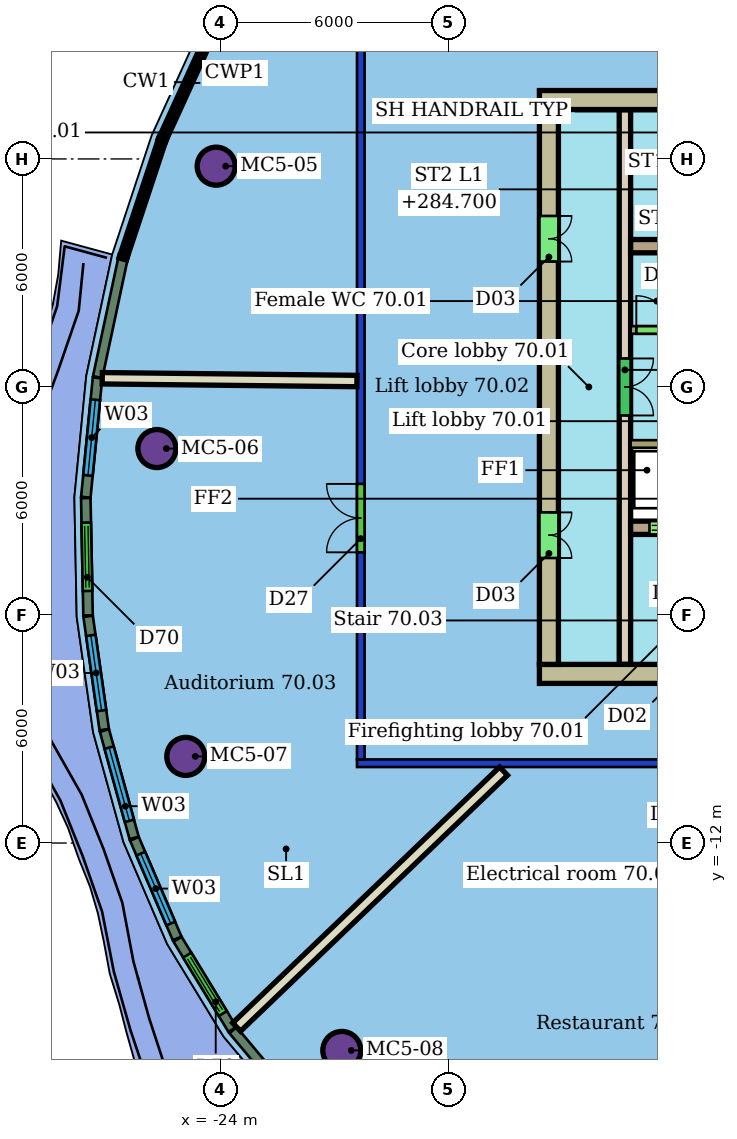
"""IFC4 building model, lengths in metres.
Left out: names, types, materials, properties, quantities, classifications, styles, units other than length and angle.
Written with IfcOpenShell. Run it as: python <this file> out.ifc"""

import sys

from ifc_helpers import new_model, si_unit, direction, frame, frame_2d, origin, origin_2d, place, context, subcontext, project, spatial, rectangle, hollow_circle, extrude, element, fill, save


model = new_model("IFC4")
c1 = context("Model", 3, precision=1e-05, world=origin(), true_north=direction((0.0, 1.0)))
c2 = subcontext(c1, "Body", "Model", "MODEL_VIEW")
j1 = project(units=[si_unit("LENGTHUNIT", "METRE"), si_unit("PLANEANGLEUNIT", "RADIAN")], contexts=[c1])
p1 = place(None, origin())
s1 = spatial("IfcSite", under=j1, at=p1, CompositionType="ELEMENT")
p2 = place(p1, origin())
s2 = spatial("IfcBuilding", under=s1, at=p2, CompositionType="ELEMENT")
p3 = place(p2, frame((0.0, 0.0, 282.9)))
s3 = spatial("IfcBuildingStorey", under=s2, at=p3, CompositionType="ELEMENT", Elevation=282.9)
for number, where, z_axis, x_axis in (
    (1, (-24.106, 5.81, 0.0), (0.0, 0.0, 1.0), (1.0, 0.0, 0.0)),
    (2, (-25.666, -1.62, 0.0), (0.0, 0.0, 1.0), (1.0, 0.0, 0.0)),
    (3, (-24.906, -9.72, 0.0), (0.0, 0.0, 1.0), (1.0, 0.0, 0.0)),
    (4, (-20.8, -17.457, 0.0), (0.0, 0.0, 1.0), (1.0, 0.0, 0.0)),
):
    element("IfcColumn", number, at=place(p3, frame(where, z_axis=z_axis, x_axis=x_axis)), inside=s3, PredefinedType="COLUMN", context=c2, shape_type="SweptSolid", body=[
        extrude(hollow_circle(Radius=0.5, WallThickness=0.04, at=origin_2d()), origin(), (0.0, 0.0, 1.0), 3.45),
    ])
p4 = place(p3, frame((8.4, -9.9, 0.0), z_axis=(0.0, 0.0, 1.0), x_axis=(-1.0, 0.0, 0.0)))
e5 = element("IfcWall", 5, at=p4, inside=s3, PredefinedType="PARTITIONING", context=c2, shape_type="SweptSolid", body=[
    extrude(rectangle(XDim=28.8, YDim=0.2, at=frame_2d((14.4, 0.0))), origin(), (0.0, 0.0, 1.0), 3.1),
])
p5 = place(p4, frame((17.579, 0.0, 0.0)))
e6 = element("IfcOpeningElement", 6, at=p5, cuts=e5, PredefinedType="OPENING", context=c2, shape_type="SweptSolid", body=[
    extrude(rectangle(XDim=1.5, YDim=2.4, at=frame_2d((0.75, 1.2))), frame((0.0, 0.11, 0.0), z_axis=(0.0, -1.0, 0.0), x_axis=(1.0, 0.0, 0.0)), (0.0, 0.0, 1.0), 0.22),
])
p6 = place(p4, frame((9.185, 0.0, 0.0)))
e7 = element("IfcOpeningElement", 7, at=p6, cuts=e5, PredefinedType="OPENING", context=c2, shape_type="SweptSolid", body=[
    extrude(rectangle(XDim=1.8, YDim=2.4, at=frame_2d((0.9, 1.2))), frame((0.0, 0.11, 0.0), z_axis=(0.0, -1.0, 0.0), x_axis=(1.0, 0.0, 0.0)), (0.0, 0.0, 1.0), 0.22),
])
p7 = place(p3, frame((-20.3, -9.8, 0.0), z_axis=(0.0, 0.0, 1.0), x_axis=(0.0, 1.0, 0.0)))
e8 = element("IfcWall", 8, at=p7, inside=s3, PredefinedType="PARTITIONING", context=c2, shape_type="SweptSolid", body=[
    extrude(rectangle(XDim=19.6, YDim=0.2, at=frame_2d((9.8, 0.0))), origin(), (0.0, 0.0, 1.0), 3.1),
])
p8 = place(p7, frame((5.449, 0.0, 0.0)))
e9 = element("IfcOpeningElement", 9, at=p8, cuts=e8, PredefinedType="OPENING", context=c2, shape_type="SweptSolid", body=[
    extrude(rectangle(XDim=1.8, YDim=2.4, at=frame_2d((0.9, 1.2))), frame((0.0, 0.11, 0.0), z_axis=(0.0, -1.0, 0.0), x_axis=(1.0, 0.0, 0.0)), (0.0, 0.0, 1.0), 0.22),
])
p9 = place(p3, frame((-27.104, 0.229, 0.0), z_axis=(0.0, 0.0, 1.0), x_axis=(0.999941086317, -0.010854671562, 0.0)))
e10 = element("IfcWall", 10, at=p9, inside=s3, PredefinedType="PARTITIONING", context=c2, shape_type="SweptSolid", body=[
    extrude(rectangle(XDim=6.703, YDim=0.3, at=frame_2d((3.351, 0.0))), origin(), (0.0, 0.0, 1.0), 3.45),
])
p10 = place(p3, frame((-23.568, -16.842, 0.0), z_axis=(0.0, 0.0, 1.0), x_axis=(0.721865986277, 0.692032873393, 0.0)))
e11 = element("IfcWall", 11, at=p10, inside=s3, PredefinedType="PARTITIONING", context=c2, shape_type="SweptSolid", body=[
    extrude(rectangle(XDim=9.73, YDim=0.3, at=frame_2d((4.865, 0.0))), origin(), (0.0, 0.0, 1.0), 3.45),
])
p11 = place(p3, frame((-26.564, 3.353, 0.0), z_axis=(0.0, 0.0, 1.0), x_axis=(-0.208864865709, -0.977944511653, 0.0)))
e12 = element("IfcWall", 12, at=p11, inside=s3, PredefinedType="SOLIDWALL", context=c2, shape_type="SweptSolid", body=[
    extrude(rectangle(XDim=3.163, YDim=0.25, at=frame_2d((1.582, 0.0))), origin(), (0.0, 0.0, 1.0), 3.15),
])
p12 = place(p3, frame((-27.228, 0.238, 0.0), z_axis=(0.0, 0.0, 1.0), x_axis=(-0.097526326892, -0.995232945377, 0.0)))
e13 = element("IfcWall", 13, at=p12, inside=s3, PredefinedType="SOLIDWALL", context=c2, shape_type="SweptSolid", body=[
    extrude(rectangle(XDim=3.154, YDim=0.25, at=frame_2d((1.577, 0.0))), origin(), (0.0, 0.0, 1.0), 3.15),
])
p13 = place(p12, frame((0.577, 0.0, 0.9)))
e14 = element("IfcOpeningElement", 14, at=p13, cuts=e13, PredefinedType="OPENING", context=c2, shape_type="SweptSolid", body=[
    extrude(rectangle(XDim=2.0, YDim=2.1, at=frame_2d((1.0, 1.05))), frame((0.0, 0.135, 0.0), z_axis=(0.0, -1.0, 0.0), x_axis=(1.0, 0.0, 0.0)), (0.0, 0.0, 1.0), 0.27),
])
p14 = place(p3, frame((-27.537, -2.924, 0.0), z_axis=(0.0, 0.0, 1.0), x_axis=(0.019213534435, -0.999815403009, 0.0)))
e15 = element("IfcWall", 15, at=p14, inside=s3, PredefinedType="SOLIDWALL", context=c2, shape_type="SweptSolid", body=[
    extrude(rectangle(XDim=3.088, YDim=0.25, at=frame_2d((1.544, 0.0))), origin(), (0.0, 0.0, 1.0), 3.15),
])
p15 = place(p14, frame((0.644, 0.0, 0.0)))
e16 = element("IfcOpeningElement", 16, at=p15, cuts=e15, PredefinedType="OPENING", context=c2, shape_type="SweptSolid", body=[
    extrude(rectangle(XDim=1.8, YDim=2.4, at=frame_2d((0.9, 1.2))), frame((0.0, 0.135, 0.0), z_axis=(0.0, -1.0, 0.0), x_axis=(1.0, 0.0, 0.0)), (0.0, 0.0, 1.0), 0.27),
])
p16 = place(p3, frame((-27.476, -6.034, 0.0), z_axis=(0.0, 0.0, 1.0), x_axis=(0.140956080181, -0.990015850105, 0.0)))
e17 = element("IfcWall", 17, at=p16, inside=s3, PredefinedType="SOLIDWALL", context=c2, shape_type="SweptSolid", body=[
    extrude(rectangle(XDim=3.012, YDim=0.25, at=frame_2d((1.506, 0.0))), origin(), (0.0, 0.0, 1.0), 3.15),
])
p17 = place(p16, frame((0.506, 0.0, 0.9)))
e18 = element("IfcOpeningElement", 18, at=p17, cuts=e17, PredefinedType="OPENING", context=c2, shape_type="SweptSolid", body=[
    extrude(rectangle(XDim=2.0, YDim=2.1, at=frame_2d((1.0, 1.05))), frame((0.0, 0.135, 0.0), z_axis=(0.0, -1.0, 0.0), x_axis=(1.0, 0.0, 0.0)), (0.0, 0.0, 1.0), 0.27),
])
p18 = place(p3, frame((-27.046, -9.04, 0.0), z_axis=(0.0, 0.0, 1.0), x_axis=(0.266526791612, -0.963827510166, 0.0)))
e19 = element("IfcWall", 19, at=p18, inside=s3, PredefinedType="SOLIDWALL", context=c2, shape_type="SweptSolid", body=[
    extrude(rectangle(XDim=2.931, YDim=0.25, at=frame_2d((1.466, 0.0))), origin(), (0.0, 0.0, 1.0), 3.15),
])
p19 = place(p18, frame((0.466, 0.0, 0.9)))
e20 = element("IfcOpeningElement", 20, at=p19, cuts=e19, PredefinedType="OPENING", context=c2, shape_type="SweptSolid", body=[
    extrude(rectangle(XDim=2.0, YDim=2.1, at=frame_2d((1.0, 1.05))), frame((0.0, 0.135, 0.0), z_axis=(0.0, -1.0, 0.0), x_axis=(1.0, 0.0, 0.0)), (0.0, 0.0, 1.0), 0.27),
])
p20 = place(p3, frame((-26.257, -11.888, 0.0), z_axis=(0.0, 0.0, 1.0), x_axis=(0.394043302687, -0.919091875499, 0.0)))
e21 = element("IfcWall", 21, at=p20, inside=s3, PredefinedType="SOLIDWALL", context=c2, shape_type="SweptSolid", body=[
    extrude(rectangle(XDim=2.851, YDim=0.25, at=frame_2d((1.426, 0.0))), origin(), (0.0, 0.0, 1.0), 3.15),
])
p21 = place(p20, frame((0.426, 0.0, 0.9)))
e22 = element("IfcOpeningElement", 22, at=p21, cuts=e21, PredefinedType="OPENING", context=c2, shape_type="SweptSolid", body=[
    extrude(rectangle(XDim=2.0, YDim=2.1, at=frame_2d((1.0, 1.05))), frame((0.0, 0.135, 0.0), z_axis=(0.0, -1.0, 0.0), x_axis=(1.0, 0.0, 0.0)), (0.0, 0.0, 1.0), 0.27),
])
p22 = place(p3, frame((-25.122, -14.532, 0.0), z_axis=(0.0, 0.0, 1.0), x_axis=(0.520443293114, -0.853896234125, 0.0)))
e23 = element("IfcWall", 23, at=p22, inside=s3, PredefinedType="SOLIDWALL", context=c2, shape_type="SweptSolid", body=[
    extrude(rectangle(XDim=2.777, YDim=0.25, at=frame_2d((1.389, 0.0))), origin(), (0.0, 0.0, 1.0), 3.15),
])
p23 = place(p22, frame((0.489, 0.0, 0.0)))
e24 = element("IfcOpeningElement", 24, at=p23, cuts=e23, PredefinedType="OPENING", context=c2, shape_type="SweptSolid", body=[
    extrude(rectangle(XDim=1.8, YDim=2.4, at=frame_2d((0.9, 1.2))), frame((0.0, 0.135, 0.0), z_axis=(0.0, -1.0, 0.0), x_axis=(1.0, 0.0, 0.0)), (0.0, 0.0, 1.0), 0.27),
])
p24 = place(p3, frame((-23.661, -16.925, 0.0), z_axis=(0.0, 0.0, 1.0), x_axis=(0.641449708793, -0.767165087246, 0.0)))
e25 = element("IfcWall", 25, at=p24, inside=s3, PredefinedType="SOLIDWALL", context=c2, shape_type="SweptSolid", body=[
    extrude(rectangle(XDim=2.674, YDim=0.25, at=frame_2d((1.337, 0.0))), origin(), (0.0, 0.0, 1.0), 3.15),
])
p25 = place(p3, frame((-6.0, 7.55, 0.0), z_axis=(0.0, 0.0, 1.0), x_axis=(-1.0, 0.0, 0.0)))
e26 = element("IfcWall", 26, at=p25, inside=s3, PredefinedType="SHEAR", context=c2, shape_type="SweptSolid", body=[
    extrude(rectangle(XDim=9.6, YDim=0.5, at=frame_2d((4.8, 0.0))), origin(), (0.0, 0.0, 1.0), 3.3),
])
p26 = place(p25, frame((5.2, 0.0, 0.0)))
e27 = element("IfcOpeningElement", 27, at=p26, cuts=e26, PredefinedType="OPENING", context=c2, shape_type="SweptSolid", body=[
    extrude(rectangle(XDim=1.2, YDim=2.1, at=frame_2d((0.6, 1.05))), frame((0.0, 0.26, 0.0), z_axis=(0.0, -1.0, 0.0), x_axis=(1.0, 0.0, 0.0)), (0.0, 0.0, 1.0), 0.52),
])
p27 = place(p3, frame((-15.6, -7.55, 0.0), z_axis=(0.0, 0.0, 1.0), x_axis=(1.0, 0.0, 0.0)))
e28 = element("IfcWall", 28, at=p27, inside=s3, PredefinedType="SHEAR", context=c2, shape_type="SweptSolid", body=[
    extrude(rectangle(XDim=19.2, YDim=0.5, at=frame_2d((9.6, 0.0))), origin(), (0.0, 0.0, 1.0), 3.3),
])
p28 = place(p27, frame((3.6, 0.0, 0.0)))
e29 = element("IfcOpeningElement", 29, at=p28, cuts=e28, PredefinedType="OPENING", context=c2, shape_type="SweptSolid", body=[
    extrude(rectangle(XDim=1.2, YDim=2.1, at=frame_2d((0.6, 1.05))), frame((0.0, 0.26, 0.0), z_axis=(0.0, -1.0, 0.0), x_axis=(1.0, 0.0, 0.0)), (0.0, 0.0, 1.0), 0.52),
])
p29 = place(p3, frame((-15.35, 7.3, 0.0), z_axis=(0.0, 0.0, 1.0), x_axis=(0.0, -1.0, 0.0)))
e30 = element("IfcWall", 30, at=p29, inside=s3, PredefinedType="SHEAR", context=c2, shape_type="SweptSolid", body=[
    extrude(rectangle(XDim=14.6, YDim=0.5, at=frame_2d((7.3, 0.0))), origin(), (0.0, 0.0, 1.0), 3.3),
])
p30 = place(p29, frame((10.6, 0.0, 0.0)))
e31 = element("IfcOpeningElement", 31, at=p30, cuts=e30, PredefinedType="OPENING", context=c2, shape_type="SweptSolid", body=[
    extrude(rectangle(XDim=1.2, YDim=2.1, at=frame_2d((0.6, 1.05))), frame((0.0, 0.26, 0.0), z_axis=(0.0, -1.0, 0.0), x_axis=(1.0, 0.0, 0.0)), (0.0, 0.0, 1.0), 0.52),
])
p31 = place(p29, frame((2.8, 0.0, 0.0)))
e32 = element("IfcOpeningElement", 32, at=p31, cuts=e30, PredefinedType="OPENING", context=c2, shape_type="SweptSolid", body=[
    extrude(rectangle(XDim=1.2, YDim=2.1, at=frame_2d((0.6, 1.05))), frame((0.0, 0.26, 0.0), z_axis=(0.0, -1.0, 0.0), x_axis=(1.0, 0.0, 0.0)), (0.0, 0.0, 1.0), 0.52),
])
p32 = place(p3, frame((-13.2, 3.705, 0.0), z_axis=(0.0, 0.0, 1.0), x_axis=(1.0, 0.0, 0.0)))
e33 = element("IfcWall", 33, at=p32, inside=s3, PredefinedType="SHEAR", context=c2, shape_type="SweptSolid", body=[
    extrude(rectangle(XDim=7.2, YDim=0.35, at=frame_2d((3.6, 0.0))), origin(), (0.0, 0.0, 1.0), 3.3),
])
p33 = place(p3, frame((-13.2, -3.705, 0.0), z_axis=(0.0, 0.0, 1.0), x_axis=(1.0, 0.0, 0.0)))
e34 = element("IfcWall", 34, at=p33, inside=s3, PredefinedType="SHEAR", context=c2, shape_type="SweptSolid", body=[
    extrude(rectangle(XDim=7.2, YDim=0.35, at=frame_2d((3.6, 0.0))), origin(), (0.0, 0.0, 1.0), 3.3),
])
p34 = place(p33, frame((0.496, 0.0, 0.0)))
e35 = element("IfcOpeningElement", 35, at=p34, cuts=e34, PredefinedType="OPENING", context=c2, shape_type="SweptSolid", body=[
    extrude(rectangle(XDim=1.2, YDim=2.1, at=frame_2d((0.6, 1.05))), frame((0.0, 0.185, 0.0), z_axis=(0.0, -1.0, 0.0), x_axis=(1.0, 0.0, 0.0)), (0.0, 0.0, 1.0), 0.37),
])
p35 = place(p33, frame((2.938, 0.0, 0.0)))
e36 = element("IfcOpeningElement", 36, at=p35, cuts=e34, PredefinedType="OPENING", context=c2, shape_type="SweptSolid", body=[
    extrude(rectangle(XDim=1.2, YDim=2.1, at=frame_2d((0.6, 1.05))), frame((0.0, 0.185, 0.0), z_axis=(0.0, -1.0, 0.0), x_axis=(1.0, 0.0, 0.0)), (0.0, 0.0, 1.0), 0.37),
])
p36 = place(p3, frame((-13.35, 7.3, 0.0), z_axis=(0.0, 0.0, 1.0), x_axis=(0.0, -1.0, 0.0)))
e37 = element("IfcWall", 37, at=p36, inside=s3, PredefinedType="SHEAR", context=c2, shape_type="SweptSolid", body=[
    extrude(rectangle(XDim=14.6, YDim=0.3, at=frame_2d((7.3, 0.0))), origin(), (0.0, 0.0, 1.0), 3.3),
])
p37 = place(p36, frame((6.55, 0.0, 0.0)))
e38 = element("IfcOpeningElement", 38, at=p37, cuts=e37, PredefinedType="OPENING", context=c2, shape_type="SweptSolid", body=[
    extrude(rectangle(XDim=1.5, YDim=2.1, at=frame_2d((0.75, 1.05))), frame((0.0, 0.16, 0.0), z_axis=(0.0, -1.0, 0.0), x_axis=(1.0, 0.0, 0.0)), (0.0, 0.0, 1.0), 0.32),
])
p38 = place(p3, frame((-13.2, 1.5, 0.0), z_axis=(0.0, 0.0, 1.0), x_axis=(1.0, 0.0, 0.0)))
e39 = element("IfcWall", 39, at=p38, inside=s3, PredefinedType="SHEAR", context=c2, shape_type="SweptSolid", body=[
    extrude(rectangle(XDim=14.4, YDim=0.2, at=frame_2d((7.2, 0.0))), origin(), (0.0, 0.0, 1.0), 3.3),
])
p39 = place(p38, frame((10.312, 0.0, 0.0)))
e40 = element("IfcOpeningElement", 40, at=p39, cuts=e39, PredefinedType="OPENING", context=c2, shape_type="SweptSolid", body=[
    extrude(rectangle(XDim=1.1, YDim=2.1, at=frame_2d((0.55, 1.05))), frame((0.0, 0.11, 0.0), z_axis=(0.0, -1.0, 0.0), x_axis=(1.0, 0.0, 0.0)), (0.0, 0.0, 1.0), 0.22),
])
p40 = place(p38, frame((12.754, 0.0, 0.0)))
e41 = element("IfcOpeningElement", 41, at=p40, cuts=e39, PredefinedType="OPENING", context=c2, shape_type="SweptSolid", body=[
    extrude(rectangle(XDim=1.1, YDim=2.1, at=frame_2d((0.55, 1.05))), frame((0.0, 0.11, 0.0), z_axis=(0.0, -1.0, 0.0), x_axis=(1.0, 0.0, 0.0)), (0.0, 0.0, 1.0), 0.22),
])
p41 = place(p38, frame((0.15, 0.0, 0.0)))
e42 = element("IfcOpeningElement", 42, at=p41, cuts=e39, PredefinedType="OPENING", context=c2, shape_type="SweptSolid", body=[
    extrude(rectangle(XDim=0.9, YDim=2.1, at=frame_2d((0.45, 1.05))), frame((0.0, 0.11, 0.0), z_axis=(0.0, -1.0, 0.0), x_axis=(1.0, 0.0, 0.0)), (0.0, 0.0, 1.0), 0.22),
])
p42 = place(p38, frame((4.222, 0.0, 0.0)))
e43 = element("IfcOpeningElement", 43, at=p42, cuts=e39, PredefinedType="OPENING", context=c2, shape_type="SweptSolid", body=[
    extrude(rectangle(XDim=0.9, YDim=2.1, at=frame_2d((0.45, 1.05))), frame((0.0, 0.11, 0.0), z_axis=(0.0, -1.0, 0.0), x_axis=(1.0, 0.0, 0.0)), (0.0, 0.0, 1.0), 0.22),
])
p43 = place(p38, frame((8.367, 0.0, 0.0)))
e44 = element("IfcOpeningElement", 44, at=p43, cuts=e39, PredefinedType="OPENING", context=c2, shape_type="SweptSolid", body=[
    extrude(rectangle(XDim=1.0, YDim=2.1, at=frame_2d((0.5, 1.05))), frame((0.0, 0.11, 0.0), z_axis=(0.0, -1.0, 0.0), x_axis=(1.0, 0.0, 0.0)), (0.0, 0.0, 1.0), 0.22),
])
p44 = place(p3, frame((1.2, -1.5, 0.0), z_axis=(0.0, 0.0, 1.0), x_axis=(-1.0, 0.0, 0.0)))
e45 = element("IfcWall", 45, at=p44, inside=s3, PredefinedType="SHEAR", context=c2, shape_type="SweptSolid", body=[
    extrude(rectangle(XDim=14.4, YDim=0.2, at=frame_2d((7.2, 0.0))), origin(), (0.0, 0.0, 1.0), 3.3),
])
p45 = place(p44, frame((7.821, 0.0, 0.0)))
e46 = element("IfcOpeningElement", 46, at=p45, cuts=e45, PredefinedType="OPENING", context=c2, shape_type="SweptSolid", body=[
    extrude(rectangle(XDim=1.2, YDim=2.1, at=frame_2d((0.6, 1.05))), frame((0.0, 0.11, 0.0), z_axis=(0.0, -1.0, 0.0), x_axis=(1.0, 0.0, 0.0)), (0.0, 0.0, 1.0), 0.22),
])
p46 = place(p44, frame((0.546, 0.0, 0.0)))
e47 = element("IfcOpeningElement", 47, at=p46, cuts=e45, PredefinedType="OPENING", context=c2, shape_type="SweptSolid", body=[
    extrude(rectangle(XDim=1.1, YDim=2.1, at=frame_2d((0.55, 1.05))), frame((0.0, 0.11, 0.0), z_axis=(0.0, -1.0, 0.0), x_axis=(1.0, 0.0, 0.0)), (0.0, 0.0, 1.0), 0.22),
])
p47 = place(p44, frame((4.335, 0.0, 0.0)))
e48 = element("IfcOpeningElement", 48, at=p47, cuts=e45, PredefinedType="OPENING", context=c2, shape_type="SweptSolid", body=[
    extrude(rectangle(XDim=1.0, YDim=2.1, at=frame_2d((0.5, 1.05))), frame((0.0, 0.11, 0.0), z_axis=(0.0, -1.0, 0.0), x_axis=(1.0, 0.0, 0.0)), (0.0, 0.0, 1.0), 0.22),
])
p48 = place(p44, frame((2.592, 0.0, 0.0)))
e49 = element("IfcOpeningElement", 49, at=p48, cuts=e45, PredefinedType="OPENING", context=c2, shape_type="SweptSolid", body=[
    extrude(rectangle(XDim=1.0, YDim=2.1, at=frame_2d((0.5, 1.05))), frame((0.0, 0.11, 0.0), z_axis=(0.0, -1.0, 0.0), x_axis=(1.0, 0.0, 0.0)), (0.0, 0.0, 1.0), 0.22),
])
p49 = place(p8, origin())
e50 = element("IfcDoor", 50, at=p49, inside=s3, OperationType="DOUBLE_DOOR_SINGLE_SWING", PredefinedType="DOOR", context=c2, shape_type="SweptSolid", body=[
    extrude(rectangle(XDim=1.8, YDim=2.4, at=frame_2d((0.9, 1.2))), frame((0.0, 0.025, 0.0), z_axis=(0.0, -1.0, 0.0), x_axis=(1.0, 0.0, 0.0)), (0.0, 0.0, 1.0), 0.05),
])
fill(e9, e50)
p50 = place(p13, origin())
e51 = element("IfcWindow", 51, at=p50, inside=s3, PartitioningType="SINGLE_PANEL", PredefinedType="WINDOW", context=c2, shape_type="SweptSolid", body=[
    extrude(rectangle(XDim=2.0, YDim=2.1, at=frame_2d((1.0, 1.05))), frame((0.0, 0.03, 0.0), z_axis=(0.0, -1.0, 0.0), x_axis=(1.0, 0.0, 0.0)), (0.0, 0.0, 1.0), 0.06),
])
fill(e14, e51)
p51 = place(p15, origin())
e52 = element("IfcDoor", 52, at=p51, inside=s3, OperationType="DOUBLE_DOOR_SLIDING", PredefinedType="DOOR", context=c2, shape_type="SweptSolid", body=[
    extrude(rectangle(XDim=1.8, YDim=2.4, at=frame_2d((0.9, 1.2))), frame((0.0, 0.025, 0.0), z_axis=(0.0, -1.0, 0.0), x_axis=(1.0, 0.0, 0.0)), (0.0, 0.0, 1.0), 0.05),
])
fill(e16, e52)
p52 = place(p17, origin())
e53 = element("IfcWindow", 53, at=p52, inside=s3, PartitioningType="SINGLE_PANEL", PredefinedType="WINDOW", context=c2, shape_type="SweptSolid", body=[
    extrude(rectangle(XDim=2.0, YDim=2.1, at=frame_2d((1.0, 1.05))), frame((0.0, 0.03, 0.0), z_axis=(0.0, -1.0, 0.0), x_axis=(1.0, 0.0, 0.0)), (0.0, 0.0, 1.0), 0.06),
])
fill(e18, e53)
p53 = place(p19, origin())
e54 = element("IfcWindow", 54, at=p53, inside=s3, PartitioningType="SINGLE_PANEL", PredefinedType="WINDOW", context=c2, shape_type="SweptSolid", body=[
    extrude(rectangle(XDim=2.0, YDim=2.1, at=frame_2d((1.0, 1.05))), frame((0.0, 0.03, 0.0), z_axis=(0.0, -1.0, 0.0), x_axis=(1.0, 0.0, 0.0)), (0.0, 0.0, 1.0), 0.06),
])
fill(e20, e54)
p54 = place(p21, origin())
e55 = element("IfcWindow", 55, at=p54, inside=s3, PartitioningType="SINGLE_PANEL", PredefinedType="WINDOW", context=c2, shape_type="SweptSolid", body=[
    extrude(rectangle(XDim=2.0, YDim=2.1, at=frame_2d((1.0, 1.05))), frame((0.0, 0.03, 0.0), z_axis=(0.0, -1.0, 0.0), x_axis=(1.0, 0.0, 0.0)), (0.0, 0.0, 1.0), 0.06),
])
fill(e22, e55)
p55 = place(p23, origin())
e56 = element("IfcDoor", 56, at=p55, inside=s3, OperationType="DOUBLE_DOOR_SLIDING", PredefinedType="DOOR", context=c2, shape_type="SweptSolid", body=[
    extrude(rectangle(XDim=1.8, YDim=2.4, at=frame_2d((0.9, 1.2))), frame((0.0, 0.025, 0.0), z_axis=(0.0, -1.0, 0.0), x_axis=(1.0, 0.0, 0.0)), (0.0, 0.0, 1.0), 0.05),
])
fill(e24, e56)
p56 = place(p30, origin())
e57 = element("IfcDoor", 57, at=p56, inside=s3, OperationType="DOUBLE_DOOR_SINGLE_SWING", PredefinedType="NOTDEFINED", context=c2, shape_type="SweptSolid", body=[
    extrude(rectangle(XDim=1.2, YDim=2.1, at=frame_2d((0.6, 1.05))), frame((0.0, 0.025, 0.0), z_axis=(0.0, -1.0, 0.0), x_axis=(1.0, 0.0, 0.0)), (0.0, 0.0, 1.0), 0.05),
])
fill(e31, e57)
p57 = place(p31, origin())
e58 = element("IfcDoor", 58, at=p57, inside=s3, OperationType="DOUBLE_DOOR_SINGLE_SWING", PredefinedType="NOTDEFINED", context=c2, shape_type="SweptSolid", body=[
    extrude(rectangle(XDim=1.2, YDim=2.1, at=frame_2d((0.6, 1.05))), frame((0.0, 0.025, 0.0), z_axis=(0.0, -1.0, 0.0), x_axis=(1.0, 0.0, 0.0)), (0.0, 0.0, 1.0), 0.05),
])
fill(e32, e58)
p58 = place(p34, origin())
e59 = element("IfcDoor", 59, at=p58, inside=s3, OperationType="DOUBLE_DOOR_SLIDING", PredefinedType="NOTDEFINED", context=c2, shape_type="SweptSolid", body=[
    extrude(rectangle(XDim=1.2, YDim=2.1, at=frame_2d((0.6, 1.05))), frame((0.0, 0.025, 0.0), z_axis=(0.0, -1.0, 0.0), x_axis=(1.0, 0.0, 0.0)), (0.0, 0.0, 1.0), 0.05),
])
fill(e35, e59)
p59 = place(p37, origin())
e60 = element("IfcDoor", 60, at=p59, inside=s3, OperationType="DOUBLE_DOOR_SINGLE_SWING", PredefinedType="NOTDEFINED", context=c2, shape_type="SweptSolid", body=[
    extrude(rectangle(XDim=1.5, YDim=2.1, at=frame_2d((0.75, 1.05))), frame((0.0, 0.025, 0.0), z_axis=(0.0, -1.0, 0.0), x_axis=(1.0, 0.0, 0.0)), (0.0, 0.0, 1.0), 0.05),
])
fill(e38, e60)
p60 = place(p41, origin())
e61 = element("IfcDoor", 61, at=p60, inside=s3, OperationType="SINGLE_SWING_LEFT", PredefinedType="NOTDEFINED", context=c2, shape_type="SweptSolid", body=[
    extrude(rectangle(XDim=0.9, YDim=2.1, at=frame_2d((0.45, 1.05))), frame((0.0, 0.025, 0.0), z_axis=(0.0, -1.0, 0.0), x_axis=(1.0, 0.0, 0.0)), (0.0, 0.0, 1.0), 0.05),
])
fill(e42, e61)
save(model, sys.argv[1])
